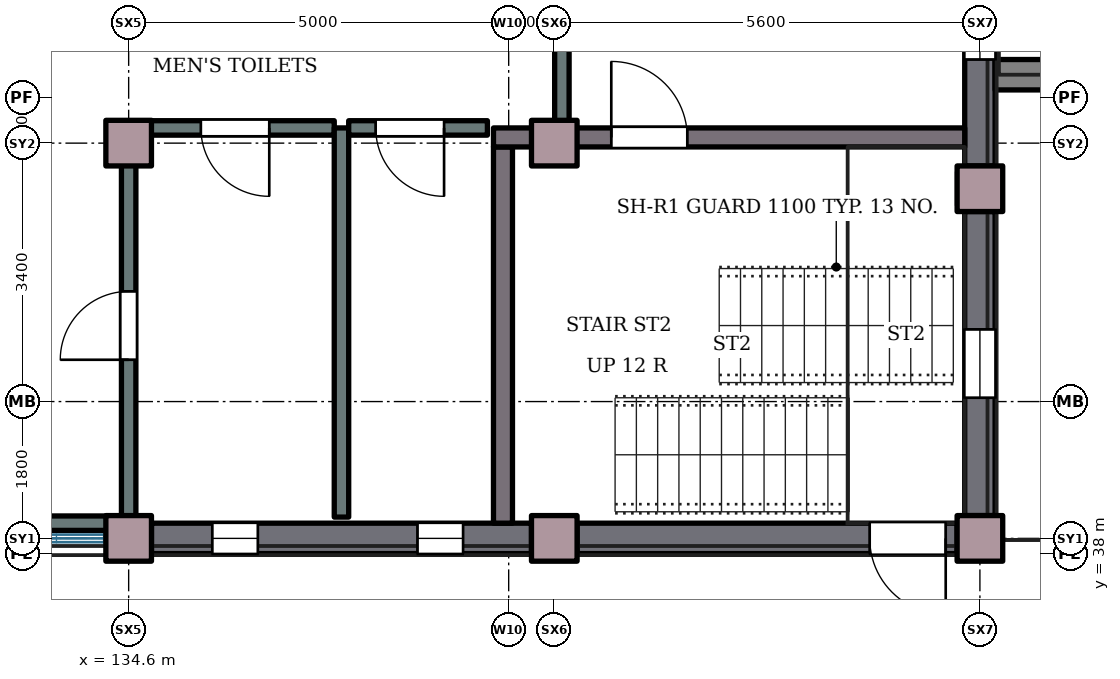
"""IFC4 building model, lengths in metres.
Left out: names, types, materials, properties, quantities, classifications, styles, units other than length and angle.
Written with IfcOpenShell. Run it as: python <this file> out.ifc"""

import sys

from ifc_helpers import new_model, si_unit, direction, frame, frame_2d, origin, origin_2d, place, context, subcontext, project, spatial, rectangle, extrude, element, fill, save


model = new_model("IFC4")
c1 = context("Model", 3, precision=1e-05, world=origin(), true_north=direction((0.0, 1.0)))
c2 = subcontext(c1, "Body", "Model", "MODEL_VIEW")
j1 = project(units=[si_unit("LENGTHUNIT", "METRE"), si_unit("PLANEANGLEUNIT", "RADIAN")], contexts=[c1])
p1 = place(None, origin())
s1 = spatial("IfcSite", under=j1, at=p1, CompositionType="ELEMENT")
p2 = place(p1, origin())
s2 = spatial("IfcBuilding", under=s1, at=p2, CompositionType="ELEMENT")
p3 = place(p2, origin())
s3 = spatial("IfcBuildingStorey", under=s2, at=p3, CompositionType="ELEMENT", Elevation=0.0)
for number, where, z_axis, x_axis in (
    (1, (134.6, 38.2, 0.0), (0.0, 0.0, 1.0), (1.0, 0.0, 0.0)),
    (2, (140.2, 38.2, 0.0), (0.0, 0.0, 1.0), (1.0, 0.0, 0.0)),
    (3, (145.8, 38.2, 0.0), (0.0, 0.0, 1.0), (1.0, 0.0, 0.0)),
    (4, (145.8, 42.8, 0.0), (0.0, 0.0, 1.0), (1.0, 0.0, 0.0)),
    (5, (134.6, 43.4, 0.0), (0.0, 0.0, 1.0), (1.0, 0.0, 0.0)),
    (6, (140.2, 43.4, 0.0), (0.0, 0.0, 1.0), (1.0, 0.0, 0.0)),
):
    element("IfcColumn", number, at=place(p3, frame(where, z_axis=z_axis, x_axis=x_axis)), inside=s3, PredefinedType="COLUMN", context=c2, shape_type="SweptSolid", body=[
        extrude(rectangle(XDim=0.6, YDim=0.6, at=origin_2d()), origin(), (0.0, 0.0, 1.0), 4.2),
    ])
p4 = place(p3, frame((139.9, 38.2, 0.0), z_axis=(0.0, 0.0, 1.0), x_axis=(-1.0, 0.0, 0.0)))
e7 = element("IfcWall", 7, at=p4, inside=s3, PredefinedType="SOLIDWALL", context=c2, shape_type="SweptSolid", body=[
    extrude(rectangle(XDim=5.0, YDim=0.4, at=frame_2d((2.5, 0.0))), origin(), (0.0, 0.0, 1.0), 4.2),
])
p5 = place(p4, frame((3.6, 0.0, 1.6)))
e8 = element("IfcOpeningElement", 8, at=p5, cuts=e7, PredefinedType="OPENING", context=c2, shape_type="SweptSolid", body=[
    extrude(rectangle(XDim=0.6, YDim=0.6, at=frame_2d((0.3, 0.3))), frame((0.0, 0.21, 0.0), z_axis=(0.0, -1.0, 0.0), x_axis=(1.0, 0.0, 0.0)), (0.0, 0.0, 1.0), 0.42),
])
p6 = place(p4, frame((0.9, 0.0, 1.6)))
e9 = element("IfcOpeningElement", 9, at=p6, cuts=e7, PredefinedType="OPENING", context=c2, shape_type="SweptSolid", body=[
    extrude(rectangle(XDim=0.6, YDim=0.6, at=frame_2d((0.3, 0.3))), frame((0.0, 0.21, 0.0), z_axis=(0.0, -1.0, 0.0), x_axis=(1.0, 0.0, 0.0)), (0.0, 0.0, 1.0), 0.42),
])
p7 = place(p3, frame((145.5, 38.2, 0.0), z_axis=(0.0, 0.0, 1.0), x_axis=(-1.0, 0.0, 0.0)))
e10 = element("IfcWall", 10, at=p7, inside=s3, PredefinedType="SOLIDWALL", context=c2, shape_type="SweptSolid", body=[
    extrude(rectangle(XDim=5.0, YDim=0.4, at=frame_2d((2.5, 0.0))), origin(), (0.0, 0.0, 1.0), 4.2),
])
p8 = place(p7, frame((0.15, 0.0, 0.0)))
e11 = element("IfcOpeningElement", 11, at=p8, cuts=e10, PredefinedType="OPENING", context=c2, shape_type="SweptSolid", body=[
    extrude(rectangle(XDim=1.0, YDim=2.4, at=frame_2d((0.5, 1.2))), frame((0.0, 0.21, 0.0), z_axis=(0.0, -1.0, 0.0), x_axis=(1.0, 0.0, 0.0)), (0.0, 0.0, 1.0), 0.42),
])
p9 = place(p3, frame((145.8, 38.5, 0.0), z_axis=(0.0, 0.0, 1.0), x_axis=(0.0, 1.0, 0.0)))
e12 = element("IfcWall", 12, at=p9, inside=s3, PredefinedType="SOLIDWALL", context=c2, shape_type="SweptSolid", body=[
    extrude(rectangle(XDim=4.0, YDim=0.4, at=frame_2d((2.0, 0.0))), origin(), (0.0, 0.0, 1.0), 4.2),
])
p10 = place(p9, frame((1.55, 0.0, 0.9)))
e13 = element("IfcOpeningElement", 13, at=p10, cuts=e12, PredefinedType="OPENING", context=c2, shape_type="SweptSolid", body=[
    extrude(rectangle(XDim=0.9, YDim=1.5, at=frame_2d((0.45, 0.75))), frame((0.0, 0.21, 0.0), z_axis=(0.0, -1.0, 0.0), x_axis=(1.0, 0.0, 0.0)), (0.0, 0.0, 1.0), 0.42),
])
p11 = place(p3, frame((145.8, 43.1, 0.0), z_axis=(0.0, 0.0, 1.0), x_axis=(0.0, 1.0, 0.0)))
e14 = element("IfcWall", 14, at=p11, inside=s3, PredefinedType="SOLIDWALL", context=c2, shape_type="SweptSolid", body=[
    extrude(rectangle(XDim=4.0, YDim=0.4, at=frame_2d((2.0, 0.0))), origin(), (0.0, 0.0, 1.0), 4.2),
])
p12 = place(p11, frame((1.4, 0.0, 1.2)))
e15 = element("IfcOpeningElement", 15, at=p12, cuts=e14, PredefinedType="OPENING", context=c2, shape_type="SweptSolid", body=[
    extrude(rectangle(XDim=1.2, YDim=1.8, at=frame_2d((0.6, 0.9))), frame((0.0, 0.21, 0.0), z_axis=(0.0, -1.0, 0.0), x_axis=(1.0, 0.0, 0.0)), (0.0, 0.0, 1.0), 0.42),
])
p13 = place(p3, frame((139.525, 38.4, 0.0), z_axis=(0.0, 0.0, 1.0), x_axis=(0.0, 1.0, 0.0)))
e16 = element("IfcWall", 16, at=p13, inside=s3, PredefinedType="SHEAR", context=c2, shape_type="SweptSolid", body=[
    extrude(rectangle(XDim=4.95, YDim=0.25, at=frame_2d((2.475, 0.0))), origin(), (0.0, 0.0, 1.0), 4.2),
])
p14 = place(p3, frame((139.4, 43.475, 0.0), z_axis=(0.0, 0.0, 1.0), x_axis=(1.0, 0.0, 0.0)))
e17 = element("IfcWall", 17, at=p14, inside=s3, PredefinedType="SHEAR", context=c2, shape_type="SweptSolid", body=[
    extrude(rectangle(XDim=6.2, YDim=0.25, at=frame_2d((3.1, 0.0))), origin(), (0.0, 0.0, 1.0), 4.2),
])
p15 = place(p14, frame((1.55, 0.0, 0.0)))
e18 = element("IfcOpeningElement", 18, at=p15, cuts=e17, PredefinedType="OPENING", context=c2, shape_type="SweptSolid", body=[
    extrude(rectangle(XDim=1.0, YDim=2.1, at=frame_2d((0.5, 1.05))), frame((0.0, 0.135, 0.0), z_axis=(0.0, -1.0, 0.0), x_axis=(1.0, 0.0, 0.0)), (0.0, 0.0, 1.0), 0.27),
])
p16 = place(p3, frame((148.1, 44.3, 0.0), z_axis=(0.0, 0.0, 1.0), x_axis=(-1.0, 0.0, 0.0)))
e19 = element("IfcWall", 19, at=p16, inside=s3, PredefinedType="STANDARD", context=c2, shape_type="SweptSolid", body=[
    extrude(rectangle(XDim=2.1, YDim=0.4, at=frame_2d((1.05, 0.0))), origin(), (0.0, 0.0, 1.0), 4.2),
])
p17 = place(p3, frame((133.08, 38.4, 0.0), z_axis=(0.0, 0.0, 1.0), x_axis=(1.0, 0.0, 0.0)))
e20 = element("IfcWall", 20, at=p17, inside=s3, PredefinedType="PARTITIONING", context=c2, shape_type="SweptSolid", body=[
    extrude(rectangle(XDim=1.52, YDim=0.19, at=frame_2d((0.76, 0.0))), origin(), (0.0, 0.0, 1.0), 3.9),
])
p18 = place(p3, frame((134.6, 38.495, 0.0), z_axis=(0.0, 0.0, 1.0), x_axis=(0.0, 1.0, 0.0)))
e21 = element("IfcWall", 21, at=p18, inside=s3, PredefinedType="PARTITIONING", context=c2, shape_type="SweptSolid", body=[
    extrude(rectangle(XDim=5.085, YDim=0.19, at=frame_2d((2.542, 0.0))), origin(), (0.0, 0.0, 1.0), 3.9),
])
p19 = place(p18, frame((2.055, 0.0, 0.0)))
e22 = element("IfcOpeningElement", 22, at=p19, cuts=e21, PredefinedType="OPENING", context=c2, shape_type="SweptSolid", body=[
    extrude(rectangle(XDim=0.9, YDim=2.1, at=frame_2d((0.45, 1.05))), frame((0.0, 0.105, 0.0), z_axis=(0.0, -1.0, 0.0), x_axis=(1.0, 0.0, 0.0)), (0.0, 0.0, 1.0), 0.21),
])
p20 = place(p3, frame((137.305, 43.6, 0.0), z_axis=(0.0, 0.0, 1.0), x_axis=(-1.0, 0.0, 0.0)))
e23 = element("IfcWall", 23, at=p20, inside=s3, PredefinedType="PARTITIONING", context=c2, shape_type="SweptSolid", body=[
    extrude(rectangle(XDim=2.685, YDim=0.19, at=frame_2d((1.342, 0.0))), origin(), (0.0, 0.0, 1.0), 3.9),
])
p21 = place(p20, frame((0.855, 0.0, 0.0)))
e24 = element("IfcOpeningElement", 24, at=p21, cuts=e23, PredefinedType="OPENING", context=c2, shape_type="SweptSolid", body=[
    extrude(rectangle(XDim=0.9, YDim=2.1, at=frame_2d((0.45, 1.05))), frame((0.0, 0.105, 0.0), z_axis=(0.0, -1.0, 0.0), x_axis=(1.0, 0.0, 0.0)), (0.0, 0.0, 1.0), 0.21),
])
p22 = place(p3, frame((137.4, 38.48, 0.0), z_axis=(0.0, 0.0, 1.0), x_axis=(0.0, 1.0, 0.0)))
e25 = element("IfcWall", 25, at=p22, inside=s3, PredefinedType="PARTITIONING", context=c2, shape_type="SweptSolid", body=[
    extrude(rectangle(XDim=5.12, YDim=0.19, at=frame_2d((2.56, 0.0))), origin(), (0.0, 0.0, 1.0), 3.9),
])
p23 = place(p3, frame((139.32, 43.6, 0.0), z_axis=(0.0, 0.0, 1.0), x_axis=(-1.0, 0.0, 0.0)))
e26 = element("IfcWall", 26, at=p23, inside=s3, PredefinedType="PARTITIONING", context=c2, shape_type="SweptSolid", body=[
    extrude(rectangle(XDim=1.825, YDim=0.19, at=frame_2d((0.913, 0.0))), origin(), (0.0, 0.0, 1.0), 3.9),
])
p24 = place(p23, frame((0.57, 0.0, 0.0)))
e27 = element("IfcOpeningElement", 27, at=p24, cuts=e26, PredefinedType="OPENING", context=c2, shape_type="SweptSolid", body=[
    extrude(rectangle(XDim=0.9, YDim=2.1, at=frame_2d((0.45, 1.05))), frame((0.0, 0.105, 0.0), z_axis=(0.0, -1.0, 0.0), x_axis=(1.0, 0.0, 0.0)), (0.0, 0.0, 1.0), 0.21),
])
p25 = place(p3, frame((139.98, 38.4, 0.0), z_axis=(0.0, 0.0, 1.0), x_axis=(1.0, 0.0, 0.0)))
e28 = element("IfcWall", 28, at=p25, inside=s3, PredefinedType="PARTITIONING", context=c2, shape_type="SweptSolid", body=[
    extrude(rectangle(XDim=0.44, YDim=0.19, at=frame_2d((0.22, 0.0))), origin(), (0.0, 0.0, 1.0), 3.9),
])
p26 = place(p3, frame((140.3, 43.68, 0.0), z_axis=(0.0, 0.0, 1.0), x_axis=(0.0, 1.0, 0.0)))
e29 = element("IfcWall", 29, at=p26, inside=s3, PredefinedType="PARTITIONING", context=c2, shape_type="SweptSolid", body=[
    extrude(rectangle(XDim=2.92, YDim=0.19, at=frame_2d((1.46, 0.0))), origin(), (0.0, 0.0, 1.0), 3.9),
])
p27 = place(p26, frame((0.97, 0.0, 0.0)))
e30 = element("IfcOpeningElement", 30, at=p27, cuts=e29, PredefinedType="OPENING", context=c2, shape_type="SweptSolid", body=[
    extrude(rectangle(XDim=1.0, YDim=2.1, at=frame_2d((0.5, 1.05))), frame((0.0, 0.105, 0.0), z_axis=(0.0, -1.0, 0.0), x_axis=(1.0, 0.0, 0.0)), (0.0, 0.0, 1.0), 0.21),
])
p28 = place(p3, frame((145.6, 42.58, 0.0), z_axis=(0.0, 0.0, 1.0), x_axis=(0.0, 1.0, 0.0)))
e31 = element("IfcWall", 31, at=p28, inside=s3, PredefinedType="PARTITIONING", context=c2, shape_type="SweptSolid", body=[
    extrude(rectangle(XDim=0.44, YDim=0.19, at=frame_2d((0.22, 0.0))), origin(), (0.0, 0.0, 1.0), 3.9),
])
p29 = place(p8, origin())
e32 = element("IfcDoor", 32, at=p29, inside=s3, OperationType="SINGLE_SWING_LEFT", PredefinedType="DOOR", context=c2, shape_type="SweptSolid", body=[
    extrude(rectangle(XDim=1.0, YDim=2.4, at=frame_2d((0.5, 1.2))), frame((0.0, 0.025, 0.0), z_axis=(0.0, -1.0, 0.0), x_axis=(1.0, 0.0, 0.0)), (0.0, 0.0, 1.0), 0.05),
])
fill(e11, e32)
p30 = place(p5, origin())
e33 = element("IfcWindow", 33, at=p30, inside=s3, PartitioningType="SINGLE_PANEL", PredefinedType="WINDOW", context=c2, shape_type="SweptSolid", body=[
    extrude(rectangle(XDim=0.6, YDim=0.6, at=frame_2d((0.3, 0.3))), frame((0.0, 0.03, 0.0), z_axis=(0.0, -1.0, 0.0), x_axis=(1.0, 0.0, 0.0)), (0.0, 0.0, 1.0), 0.06),
])
fill(e8, e33)
p31 = place(p6, origin())
e34 = element("IfcWindow", 34, at=p31, inside=s3, PartitioningType="SINGLE_PANEL", PredefinedType="WINDOW", context=c2, shape_type="SweptSolid", body=[
    extrude(rectangle(XDim=0.6, YDim=0.6, at=frame_2d((0.3, 0.3))), frame((0.0, 0.03, 0.0), z_axis=(0.0, -1.0, 0.0), x_axis=(1.0, 0.0, 0.0)), (0.0, 0.0, 1.0), 0.06),
])
fill(e9, e34)
p32 = place(p10, origin())
e35 = element("IfcWindow", 35, at=p32, inside=s3, PartitioningType="SINGLE_PANEL", PredefinedType="WINDOW", context=c2, shape_type="SweptSolid", body=[
    extrude(rectangle(XDim=0.9, YDim=1.5, at=frame_2d((0.45, 0.75))), frame((0.0, 0.03, 0.0), z_axis=(0.0, -1.0, 0.0), x_axis=(1.0, 0.0, 0.0)), (0.0, 0.0, 1.0), 0.06),
])
fill(e13, e35)
p33 = place(p12, origin())
e36 = element("IfcWindow", 36, at=p33, inside=s3, PartitioningType="SINGLE_PANEL", PredefinedType="WINDOW", context=c2, shape_type="SweptSolid", body=[
    extrude(rectangle(XDim=1.2, YDim=1.8, at=frame_2d((0.6, 0.9))), frame((0.0, 0.03, 0.0), z_axis=(0.0, -1.0, 0.0), x_axis=(1.0, 0.0, 0.0)), (0.0, 0.0, 1.0), 0.06),
])
fill(e15, e36)
p34 = place(p19, origin())
e37 = element("IfcDoor", 37, at=p34, inside=s3, OperationType="SINGLE_SWING_LEFT", PredefinedType="DOOR", context=c2, shape_type="SweptSolid", body=[
    extrude(rectangle(XDim=0.9, YDim=2.1, at=frame_2d((0.45, 1.05))), frame((0.0, 0.025, 0.0), z_axis=(0.0, -1.0, 0.0), x_axis=(1.0, 0.0, 0.0)), (0.0, 0.0, 1.0), 0.05),
])
fill(e22, e37)
p35 = place(p21, origin())
e38 = element("IfcDoor", 38, at=p35, inside=s3, OperationType="SINGLE_SWING_LEFT", PredefinedType="DOOR", context=c2, shape_type="SweptSolid", body=[
    extrude(rectangle(XDim=0.9, YDim=2.1, at=frame_2d((0.45, 1.05))), frame((0.0, 0.025, 0.0), z_axis=(0.0, -1.0, 0.0), x_axis=(1.0, 0.0, 0.0)), (0.0, 0.0, 1.0), 0.05),
])
fill(e24, e38)
p36 = place(p24, origin())
e39 = element("IfcDoor", 39, at=p36, inside=s3, OperationType="SINGLE_SWING_LEFT", PredefinedType="DOOR", context=c2, shape_type="SweptSolid", body=[
    extrude(rectangle(XDim=0.9, YDim=2.1, at=frame_2d((0.45, 1.05))), frame((0.0, 0.025, 0.0), z_axis=(0.0, -1.0, 0.0), x_axis=(1.0, 0.0, 0.0)), (0.0, 0.0, 1.0), 0.05),
])
fill(e27, e39)
p37 = place(p15, origin())
e40 = element("IfcDoor", 40, at=p37, inside=s3, OperationType="SINGLE_SWING_LEFT", PredefinedType="DOOR", context=c2, shape_type="SweptSolid", body=[
    extrude(rectangle(XDim=1.0, YDim=2.1, at=frame_2d((0.5, 1.05))), frame((0.0, 0.025, 0.0), z_axis=(0.0, -1.0, 0.0), x_axis=(1.0, 0.0, 0.0)), (0.0, 0.0, 1.0), 0.05),
])
fill(e18, e40)
save(model, sys.argv[1])
